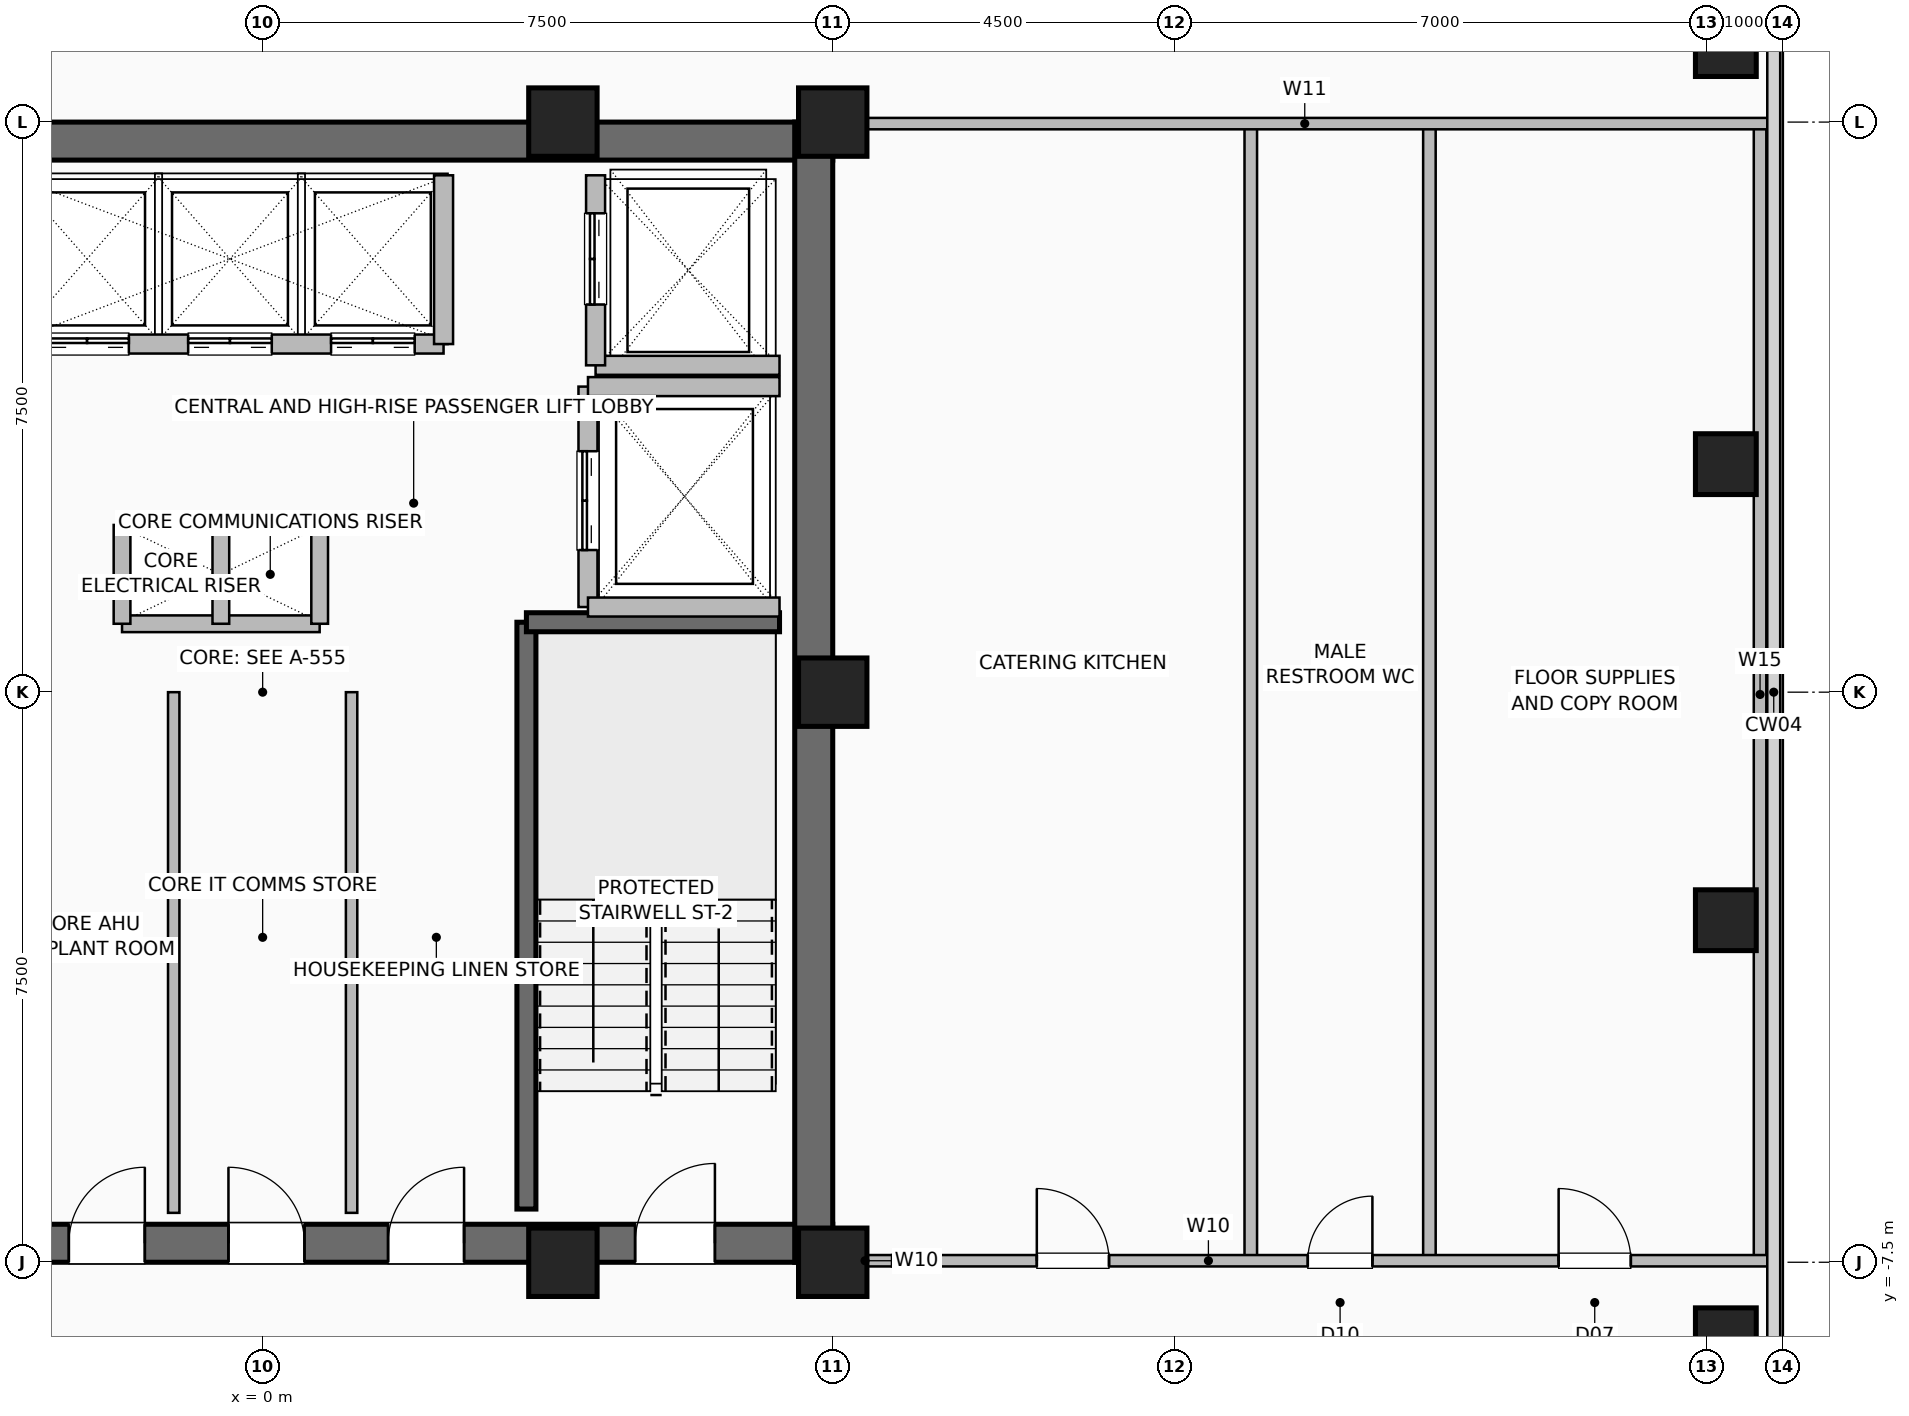
"""IFC4 building model, lengths in metres.
Left out: names, types, materials, properties, quantities, classifications, styles, units other than length and angle.
Written with IfcOpenShell. Run it as: python <this file> out.ifc"""

import sys

from ifc_helpers import new_model, si_unit, direction, frame, frame_2d, origin, origin_2d, place, context, subcontext, project, spatial, rectangle, hollow_rectangle, extrude, element, fill, save


model = new_model("IFC4")
c1 = context("Model", 3, precision=1e-05, world=origin(), true_north=direction((0.0, 1.0)))
c2 = subcontext(c1, "Body", "Model", "MODEL_VIEW")
j1 = project(units=[si_unit("LENGTHUNIT", "METRE"), si_unit("PLANEANGLEUNIT", "RADIAN")], contexts=[c1])
p1 = place(None, origin())
s1 = spatial("IfcSite", under=j1, at=p1, CompositionType="ELEMENT")
p2 = place(p1, origin())
s2 = spatial("IfcBuilding", under=s1, at=p2, CompositionType="ELEMENT")
p3 = place(p2, frame((0.0, 0.0, 220.2)))
s3 = spatial("IfcBuildingStorey", under=s2, at=p3, CompositionType="ELEMENT", Elevation=220.2)
for number, where, z_axis, x_axis in (
    (1, (3.95, -7.5, 0.0), (0.0, 0.0, 1.0), (1.0, 0.0, 0.0)),
    (2, (7.5, -7.5, 0.0), (0.0, 0.0, 1.0), (1.0, 0.0, 0.0)),
    (3, (7.5, 0.0, 0.0), (0.0, 0.0, 1.0), (1.0, 0.0, 0.0)),
    (4, (7.5, 7.5, 0.0), (0.0, 0.0, 1.0), (1.0, 0.0, 0.0)),
    (5, (3.95, 7.5, 0.0), (0.0, 0.0, 1.0), (1.0, 0.0, 0.0)),
):
    element("IfcColumn", number, at=place(p3, frame(where, z_axis=z_axis, x_axis=x_axis)), inside=s3, PredefinedType="COLUMN", context=c2, shape_type="SweptSolid", body=[
        extrude(hollow_rectangle(XDim=0.9, YDim=0.9, WallThickness=0.045, at=origin_2d()), origin(), (0.0, 0.0, 1.0), 3.6),
    ])
for number, where, z_axis, x_axis in (
    (6, (19.25, -8.5, 0.0), (0.0, 0.0, 1.0), (1.0, 0.0, 0.0)),
    (7, (19.25, -3.0, 0.0), (0.0, 0.0, 1.0), (1.0, 0.0, 0.0)),
    (8, (19.25, 3.0, 0.0), (0.0, 0.0, 1.0), (1.0, 0.0, 0.0)),
    (9, (19.25, 8.5, 0.0), (0.0, 0.0, 1.0), (1.0, 0.0, 0.0)),
):
    element("IfcColumn", number, at=place(p3, frame(where, z_axis=z_axis, x_axis=x_axis)), inside=s3, PredefinedType="COLUMN", context=c2, shape_type="SweptSolid", body=[
        extrude(hollow_rectangle(XDim=0.8, YDim=0.8, WallThickness=0.04, at=origin_2d()), origin(), (0.0, 0.0, 1.0), 3.6),
    ])
p4 = place(p3, frame((-7.5, -7.25, 0.0), z_axis=(0.0, 0.0, 1.0), x_axis=(1.0, 0.0, 0.0)))
e10 = element("IfcWall", 10, at=p4, inside=s3, PredefinedType="SHEAR", context=c2, shape_type="SweptSolid", body=[
    extrude(rectangle(XDim=15.0, YDim=0.5, at=frame_2d((7.5, 0.0))), origin(), (0.0, 0.0, 1.0), 3.36),
])
p5 = place(p4, frame((1.55, 0.0, 0.0)))
e11 = element("IfcOpeningElement", 11, at=p5, cuts=e10, PredefinedType="OPENING", context=c2, shape_type="SweptSolid", body=[
    extrude(rectangle(XDim=1.05, YDim=2.08, at=frame_2d((0.525, 1.04))), frame((0.0, 0.26, 0.0), z_axis=(0.0, -1.0, 0.0), x_axis=(1.0, 0.0, 0.0)), (0.0, 0.0, 1.0), 0.52),
])
p6 = place(p4, frame((12.4, 0.0, 0.0)))
e12 = element("IfcOpeningElement", 12, at=p6, cuts=e10, PredefinedType="OPENING", context=c2, shape_type="SweptSolid", body=[
    extrude(rectangle(XDim=1.05, YDim=2.08, at=frame_2d((0.525, 1.04))), frame((0.0, 0.26, 0.0), z_axis=(0.0, -1.0, 0.0), x_axis=(1.0, 0.0, 0.0)), (0.0, 0.0, 1.0), 0.52),
])
p7 = place(p4, frame((4.95, 0.0, 0.0)))
e13 = element("IfcOpeningElement", 13, at=p7, cuts=e10, PredefinedType="OPENING", context=c2, shape_type="SweptSolid", body=[
    extrude(rectangle(XDim=1.0, YDim=2.08, at=frame_2d((0.5, 1.04))), frame((0.0, 0.26, 0.0), z_axis=(0.0, -1.0, 0.0), x_axis=(1.0, 0.0, 0.0)), (0.0, 0.0, 1.0), 0.52),
])
p8 = place(p4, frame((7.05, 0.0, 0.0)))
e14 = element("IfcOpeningElement", 14, at=p8, cuts=e10, PredefinedType="OPENING", context=c2, shape_type="SweptSolid", body=[
    extrude(rectangle(XDim=1.0, YDim=2.08, at=frame_2d((0.5, 1.04))), frame((0.0, 0.26, 0.0), z_axis=(0.0, -1.0, 0.0), x_axis=(1.0, 0.0, 0.0)), (0.0, 0.0, 1.0), 0.52),
])
p9 = place(p4, frame((9.15, 0.0, 0.0)))
e15 = element("IfcOpeningElement", 15, at=p9, cuts=e10, PredefinedType="OPENING", context=c2, shape_type="SweptSolid", body=[
    extrude(rectangle(XDim=1.0, YDim=2.08, at=frame_2d((0.5, 1.04))), frame((0.0, 0.26, 0.0), z_axis=(0.0, -1.0, 0.0), x_axis=(1.0, 0.0, 0.0)), (0.0, 0.0, 1.0), 0.52),
])
for number, where, z_axis, x_axis in (
    (16, (-7.5, 7.25, 0.0), (0.0, 0.0, 1.0), (1.0, 0.0, 0.0)),
    (17, (7.25, -7.5, 0.0), (0.0, 0.0, 1.0), (0.0, 1.0, 0.0)),
):
    element("IfcWall", number, at=place(p3, frame(where, z_axis=z_axis, x_axis=x_axis)), inside=s3, PredefinedType="SHEAR", context=c2, shape_type="SweptSolid", body=[
        extrude(rectangle(XDim=15.0, YDim=0.5, at=frame_2d((7.5, 0.0))), origin(), (0.0, 0.0, 1.0), 3.36),
    ])
p10 = place(p3, frame((3.47, -6.8, 0.0), z_axis=(0.0, 0.0, 1.0), x_axis=(0.0, 1.0, 0.0)))
e18 = element("IfcWall", 18, at=p10, inside=s3, PredefinedType="SHEAR", context=c2, shape_type="SweptSolid", body=[
    extrude(rectangle(XDim=7.72, YDim=0.25, at=frame_2d((3.86, 0.0))), origin(), (0.0, 0.0, 1.0), 3.36),
])
p11 = place(p3, frame((3.47, 0.92, 0.0), z_axis=(0.0, 0.0, 1.0), x_axis=(1.0, 0.0, 0.0)))
e19 = element("IfcWall", 19, at=p11, inside=s3, PredefinedType="SHEAR", context=c2, shape_type="SweptSolid", body=[
    extrude(rectangle(XDim=3.33, YDim=0.25, at=frame_2d((1.665, 0.0))), origin(), (0.0, 0.0, 1.0), 3.36),
])
for number, where, z_axis, x_axis in (
    (20, (-1.85, 2.2, 0.0), (0.0, 0.0, 1.0), (1.0, 0.0, 0.0)),
    (21, (-1.85, 0.9, 0.0), (0.0, 0.0, 1.0), (1.0, 0.0, 0.0)),
):
    element("IfcWall", number, at=place(p3, frame(where, z_axis=z_axis, x_axis=x_axis)), inside=s3, PredefinedType="PARTITIONING", context=c2, shape_type="SweptSolid", body=[
        extrude(rectangle(XDim=2.6, YDim=0.22, at=frame_2d((1.3, 0.0))), origin(), (0.0, 0.0, 1.0), 3.36),
    ])
for number, where, z_axis, x_axis in (
    (22, (-0.55, 0.9, 0.0), (0.0, 0.0, 1.0), (0.0, 1.0, 0.0)),
    (23, (0.75, 0.9, 0.0), (0.0, 0.0, 1.0), (0.0, 1.0, 0.0)),
    (24, (-1.85, 0.9, 0.0), (0.0, 0.0, 1.0), (0.0, 1.0, 0.0)),
):
    element("IfcWall", number, at=place(p3, frame(where, z_axis=z_axis, x_axis=x_axis)), inside=s3, PredefinedType="PARTITIONING", context=c2, shape_type="SweptSolid", body=[
        extrude(rectangle(XDim=1.3, YDim=0.22, at=frame_2d((0.65, 0.0))), origin(), (0.0, 0.0, 1.0), 3.36),
    ])
p12 = place(p3, frame((-3.26, 4.58, 0.0), z_axis=(0.0, 0.0, 1.0), x_axis=(1.0, 0.0, 0.0)))
e25 = element("IfcWall", 25, at=p12, inside=s3, PredefinedType="SHEAR", context=c2, shape_type="SweptSolid", body=[
    extrude(rectangle(XDim=5.64, YDim=0.25, at=frame_2d((2.82, 0.0))), origin(), (0.0, 0.0, 1.0), 3.36),
])
p13 = place(p12, frame((0.4, 0.0, 0.0)))
e26 = element("IfcOpeningElement", 26, at=p13, cuts=e25, PredefinedType="OPENING", context=c2, shape_type="SweptSolid", body=[
    extrude(rectangle(XDim=1.1, YDim=2.2, at=frame_2d((0.55, 1.1))), frame((0.0, 0.135, 0.0), z_axis=(0.0, -1.0, 0.0), x_axis=(1.0, 0.0, 0.0)), (0.0, 0.0, 1.0), 0.27),
])
p14 = place(p12, frame((2.28, 0.0, 0.0)))
e27 = element("IfcOpeningElement", 27, at=p14, cuts=e25, PredefinedType="OPENING", context=c2, shape_type="SweptSolid", body=[
    extrude(rectangle(XDim=1.1, YDim=2.2, at=frame_2d((0.55, 1.1))), frame((0.0, 0.135, 0.0), z_axis=(0.0, -1.0, 0.0), x_axis=(1.0, 0.0, 0.0)), (0.0, 0.0, 1.0), 0.27),
])
p15 = place(p12, frame((4.16, 0.0, 0.0)))
e28 = element("IfcOpeningElement", 28, at=p15, cuts=e25, PredefinedType="OPENING", context=c2, shape_type="SweptSolid", body=[
    extrude(rectangle(XDim=1.1, YDim=2.2, at=frame_2d((0.55, 1.1))), frame((0.0, 0.135, 0.0), z_axis=(0.0, -1.0, 0.0), x_axis=(1.0, 0.0, 0.0)), (0.0, 0.0, 1.0), 0.27),
])
p16 = place(p3, frame((2.38, 4.58, 0.0), z_axis=(0.0, 0.0, 1.0), x_axis=(0.0, 1.0, 0.0)))
e29 = element("IfcWall", 29, at=p16, inside=s3, PredefinedType="SHEAR", context=c2, shape_type="SweptSolid", body=[
    extrude(rectangle(XDim=2.22, YDim=0.25, at=frame_2d((1.11, 0.0))), origin(), (0.0, 0.0, 1.0), 3.36),
])
p17 = place(p3, frame((4.38, 4.3, 0.0), z_axis=(0.0, 0.0, 1.0), x_axis=(1.0, 0.0, 0.0)))
e30 = element("IfcWall", 30, at=p17, inside=s3, PredefinedType="SHEAR", context=c2, shape_type="SweptSolid", body=[
    extrude(rectangle(XDim=2.42, YDim=0.25, at=frame_2d((1.21, 0.0))), origin(), (0.0, 0.0, 1.0), 3.36),
])
p18 = place(p3, frame((4.38, 4.3, 0.0), z_axis=(0.0, 0.0, 1.0), x_axis=(0.0, 1.0, 0.0)))
e31 = element("IfcWall", 31, at=p18, inside=s3, PredefinedType="SHEAR", context=c2, shape_type="SweptSolid", body=[
    extrude(rectangle(XDim=2.5, YDim=0.25, at=frame_2d((1.25, 0.0))), origin(), (0.0, 0.0, 1.0), 3.36),
])
p19 = place(p18, frame((0.8, 0.0, 0.0)))
e32 = element("IfcOpeningElement", 32, at=p19, cuts=e31, PredefinedType="OPENING", context=c2, shape_type="SweptSolid", body=[
    extrude(rectangle(XDim=1.2, YDim=2.2, at=frame_2d((0.6, 1.1))), frame((0.0, 0.135, 0.0), z_axis=(0.0, -1.0, 0.0), x_axis=(1.0, 0.0, 0.0)), (0.0, 0.0, 1.0), 0.27),
])
p20 = place(p3, frame((4.28, 1.12, 0.0), z_axis=(0.0, 0.0, 1.0), x_axis=(0.0, 1.0, 0.0)))
e33 = element("IfcWall", 33, at=p20, inside=s3, PredefinedType="SHEAR", context=c2, shape_type="SweptSolid", body=[
    extrude(rectangle(XDim=2.9, YDim=0.25, at=frame_2d((1.45, 0.0))), origin(), (0.0, 0.0, 1.0), 3.36),
])
p21 = place(p20, frame((0.75, 0.0, 0.0)))
e34 = element("IfcOpeningElement", 34, at=p21, cuts=e33, PredefinedType="OPENING", context=c2, shape_type="SweptSolid", body=[
    extrude(rectangle(XDim=1.3, YDim=2.3, at=frame_2d((0.65, 1.15))), frame((0.0, 0.135, 0.0), z_axis=(0.0, -1.0, 0.0), x_axis=(1.0, 0.0, 0.0)), (0.0, 0.0, 1.0), 0.27),
])
for number, where, z_axis, x_axis in (
    (35, (4.28, 1.12, 0.0), (0.0, 0.0, 1.0), (1.0, 0.0, 0.0)),
    (36, (4.28, 4.02, 0.0), (0.0, 0.0, 1.0), (1.0, 0.0, 0.0)),
):
    element("IfcWall", number, at=place(p3, frame(where, z_axis=z_axis, x_axis=x_axis)), inside=s3, PredefinedType="SHEAR", context=c2, shape_type="SweptSolid", body=[
        extrude(rectangle(XDim=2.52, YDim=0.25, at=frame_2d((1.26, 0.0))), origin(), (0.0, 0.0, 1.0), 3.36),
    ])
for number, where, z_axis, x_axis in (
    (37, (-1.17, -6.85, 0.0), (0.0, 0.0, 1.0), (0.0, 1.0, 0.0)),
    (38, (1.17, -6.85, 0.0), (0.0, 0.0, 1.0), (0.0, 1.0, 0.0)),
):
    element("IfcWall", number, at=place(p3, frame(where, z_axis=z_axis, x_axis=x_axis)), inside=s3, PredefinedType="PARTITIONING", context=c2, shape_type="SweptSolid", body=[
        extrude(rectangle(XDim=6.85, YDim=0.15, at=frame_2d((3.425, 0.0))), origin(), (0.0, 0.0, 1.0), 3.36),
    ])
p22 = place(p3, frame((7.45, -7.48, 0.0), z_axis=(0.0, 0.0, 1.0), x_axis=(1.0, 0.0, 0.0)))
e39 = element("IfcWall", 39, at=p22, inside=s3, PredefinedType="PARTITIONING", context=c2, shape_type="SweptSolid", body=[
    extrude(rectangle(XDim=0.95, YDim=0.15, at=frame_2d((0.475, 0.0))), origin(), (0.0, 0.0, 1.0), 3.36),
])
for number, where, z_axis, x_axis in (
    (40, (15.35, -7.48, 0.0), (0.0, 0.0, 1.0), (0.0, 1.0, 0.0)),
    (41, (13.0, -7.48, 0.0), (0.0, 0.0, 1.0), (0.0, 1.0, 0.0)),
    (42, (19.7, -7.48, 0.0), (0.0, 0.0, 1.0), (0.0, 1.0, 0.0)),
):
    element("IfcWall", number, at=place(p3, frame(where, z_axis=z_axis, x_axis=x_axis)), inside=s3, PredefinedType="PLUMBINGWALL", context=c2, shape_type="SweptSolid", body=[
        extrude(rectangle(XDim=14.9, YDim=0.165, at=frame_2d((7.45, 0.0))), origin(), (0.0, 0.0, 1.0), 3.36),
    ])
p23 = place(p3, frame((8.28, -7.48, 0.0), z_axis=(0.0, 0.0, 1.0), x_axis=(1.0, 0.0, 0.0)))
e43 = element("IfcWall", 43, at=p23, inside=s3, PredefinedType="PARTITIONING", context=c2, shape_type="SweptSolid", body=[
    extrude(rectangle(XDim=11.54, YDim=0.15, at=frame_2d((5.77, 0.0))), origin(), (0.0, 0.0, 1.0), 3.36),
])
p24 = place(p23, frame((1.905, 0.0, 0.0)))
e44 = element("IfcOpeningElement", 44, at=p24, cuts=e43, PredefinedType="OPENING", context=c2, shape_type="SweptSolid", body=[
    extrude(rectangle(XDim=0.95, YDim=2.06, at=frame_2d((0.475, 1.03))), frame((0.0, 0.085, 0.0), z_axis=(0.0, -1.0, 0.0), x_axis=(1.0, 0.0, 0.0)), (0.0, 0.0, 1.0), 0.17),
])
p25 = place(p23, frame((5.47, 0.0, 0.0)))
e45 = element("IfcOpeningElement", 45, at=p25, cuts=e43, PredefinedType="OPENING", context=c2, shape_type="SweptSolid", body=[
    extrude(rectangle(XDim=0.85, YDim=2.05, at=frame_2d((0.425, 1.025))), frame((0.0, 0.085, 0.0), z_axis=(0.0, -1.0, 0.0), x_axis=(1.0, 0.0, 0.0)), (0.0, 0.0, 1.0), 0.17),
])
p26 = place(p23, frame((8.77, 0.0, 0.0)))
e46 = element("IfcOpeningElement", 46, at=p26, cuts=e43, PredefinedType="OPENING", context=c2, shape_type="SweptSolid", body=[
    extrude(rectangle(XDim=0.95, YDim=2.06, at=frame_2d((0.475, 1.03))), frame((0.0, 0.085, 0.0), z_axis=(0.0, -1.0, 0.0), x_axis=(1.0, 0.0, 0.0)), (0.0, 0.0, 1.0), 0.17),
])
p27 = place(p3, frame((7.6, 7.48, 0.0), z_axis=(0.0, 0.0, 1.0), x_axis=(1.0, 0.0, 0.0)))
e47 = element("IfcWall", 47, at=p27, inside=s3, PredefinedType="PARTITIONING", context=c2, shape_type="SweptSolid", body=[
    extrude(rectangle(XDim=12.22, YDim=0.15, at=frame_2d((6.11, 0.0))), origin(), (0.0, 0.0, 1.0), 3.36),
])
p28 = place(p6, origin())
e48 = element("IfcDoor", 48, at=p28, inside=s3, OperationType="SINGLE_SWING_RIGHT", PredefinedType="DOOR", context=c2, shape_type="SweptSolid", body=[
    extrude(rectangle(XDim=1.05, YDim=2.08, at=frame_2d((0.525, 1.04))), frame((0.0, 0.025, 0.0), z_axis=(0.0, -1.0, 0.0), x_axis=(1.0, 0.0, 0.0)), (0.0, 0.0, 1.0), 0.05),
])
fill(e12, e48)
p29 = place(p7, origin())
e49 = element("IfcDoor", 49, at=p29, inside=s3, OperationType="SINGLE_SWING_RIGHT", PredefinedType="DOOR", context=c2, shape_type="SweptSolid", body=[
    extrude(rectangle(XDim=1.0, YDim=2.08, at=frame_2d((0.5, 1.04))), frame((0.0, 0.025, 0.0), z_axis=(0.0, -1.0, 0.0), x_axis=(1.0, 0.0, 0.0)), (0.0, 0.0, 1.0), 0.05),
])
fill(e13, e49)
p30 = place(p8, origin())
e50 = element("IfcDoor", 50, at=p30, inside=s3, OperationType="SINGLE_SWING_LEFT", PredefinedType="DOOR", context=c2, shape_type="SweptSolid", body=[
    extrude(rectangle(XDim=1.0, YDim=2.08, at=frame_2d((0.5, 1.04))), frame((0.0, 0.025, 0.0), z_axis=(0.0, -1.0, 0.0), x_axis=(1.0, 0.0, 0.0)), (0.0, 0.0, 1.0), 0.05),
])
fill(e14, e50)
p31 = place(p9, origin())
e51 = element("IfcDoor", 51, at=p31, inside=s3, OperationType="SINGLE_SWING_RIGHT", PredefinedType="DOOR", context=c2, shape_type="SweptSolid", body=[
    extrude(rectangle(XDim=1.0, YDim=2.08, at=frame_2d((0.5, 1.04))), frame((0.0, 0.025, 0.0), z_axis=(0.0, -1.0, 0.0), x_axis=(1.0, 0.0, 0.0)), (0.0, 0.0, 1.0), 0.05),
])
fill(e15, e51)
p32 = place(p13, origin())
e52 = element("IfcDoor", 52, at=p32, inside=s3, OperationType="DOUBLE_DOOR_SLIDING", PredefinedType="DOOR", context=c2, shape_type="SweptSolid", body=[
    extrude(rectangle(XDim=1.1, YDim=2.2, at=frame_2d((0.55, 1.1))), frame((0.0, 0.025, 0.0), z_axis=(0.0, -1.0, 0.0), x_axis=(1.0, 0.0, 0.0)), (0.0, 0.0, 1.0), 0.05),
])
fill(e26, e52)
p33 = place(p14, origin())
e53 = element("IfcDoor", 53, at=p33, inside=s3, OperationType="DOUBLE_DOOR_SLIDING", PredefinedType="DOOR", context=c2, shape_type="SweptSolid", body=[
    extrude(rectangle(XDim=1.1, YDim=2.2, at=frame_2d((0.55, 1.1))), frame((0.0, 0.025, 0.0), z_axis=(0.0, -1.0, 0.0), x_axis=(1.0, 0.0, 0.0)), (0.0, 0.0, 1.0), 0.05),
])
fill(e27, e53)
p34 = place(p15, origin())
e54 = element("IfcDoor", 54, at=p34, inside=s3, OperationType="DOUBLE_DOOR_SLIDING", PredefinedType="DOOR", context=c2, shape_type="SweptSolid", body=[
    extrude(rectangle(XDim=1.1, YDim=2.2, at=frame_2d((0.55, 1.1))), frame((0.0, 0.025, 0.0), z_axis=(0.0, -1.0, 0.0), x_axis=(1.0, 0.0, 0.0)), (0.0, 0.0, 1.0), 0.05),
])
fill(e28, e54)
p35 = place(p19, origin())
e55 = element("IfcDoor", 55, at=p35, inside=s3, OperationType="DOUBLE_DOOR_SLIDING", PredefinedType="DOOR", context=c2, shape_type="SweptSolid", body=[
    extrude(rectangle(XDim=1.2, YDim=2.2, at=frame_2d((0.6, 1.1))), frame((0.0, 0.025, 0.0), z_axis=(0.0, -1.0, 0.0), x_axis=(1.0, 0.0, 0.0)), (0.0, 0.0, 1.0), 0.05),
])
fill(e32, e55)
p36 = place(p21, origin())
e56 = element("IfcDoor", 56, at=p36, inside=s3, OperationType="DOUBLE_DOOR_SLIDING", PredefinedType="DOOR", context=c2, shape_type="SweptSolid", body=[
    extrude(rectangle(XDim=1.3, YDim=2.3, at=frame_2d((0.65, 1.15))), frame((0.0, 0.025, 0.0), z_axis=(0.0, -1.0, 0.0), x_axis=(1.0, 0.0, 0.0)), (0.0, 0.0, 1.0), 0.05),
])
fill(e34, e56)
p37 = place(p24, origin())
e57 = element("IfcDoor", 57, at=p37, inside=s3, OperationType="SINGLE_SWING_LEFT", PredefinedType="DOOR", context=c2, shape_type="SweptSolid", body=[
    extrude(rectangle(XDim=0.95, YDim=2.06, at=frame_2d((0.475, 1.03))), frame((0.0, 0.025, 0.0), z_axis=(0.0, -1.0, 0.0), x_axis=(1.0, 0.0, 0.0)), (0.0, 0.0, 1.0), 0.05),
])
fill(e44, e57)
p38 = place(p25, origin())
e58 = element("IfcDoor", 58, at=p38, inside=s3, OperationType="SINGLE_SWING_RIGHT", PredefinedType="DOOR", context=c2, shape_type="SweptSolid", body=[
    extrude(rectangle(XDim=0.85, YDim=2.05, at=frame_2d((0.425, 1.025))), frame((0.0, 0.025, 0.0), z_axis=(0.0, -1.0, 0.0), x_axis=(1.0, 0.0, 0.0)), (0.0, 0.0, 1.0), 0.05),
])
fill(e45, e58)
p39 = place(p26, origin())
e59 = element("IfcDoor", 59, at=p39, inside=s3, OperationType="SINGLE_SWING_LEFT", PredefinedType="DOOR", context=c2, shape_type="SweptSolid", body=[
    extrude(rectangle(XDim=0.95, YDim=2.06, at=frame_2d((0.475, 1.03))), frame((0.0, 0.025, 0.0), z_axis=(0.0, -1.0, 0.0), x_axis=(1.0, 0.0, 0.0)), (0.0, 0.0, 1.0), 0.05),
])
fill(e46, e59)
save(model, sys.argv[1])
